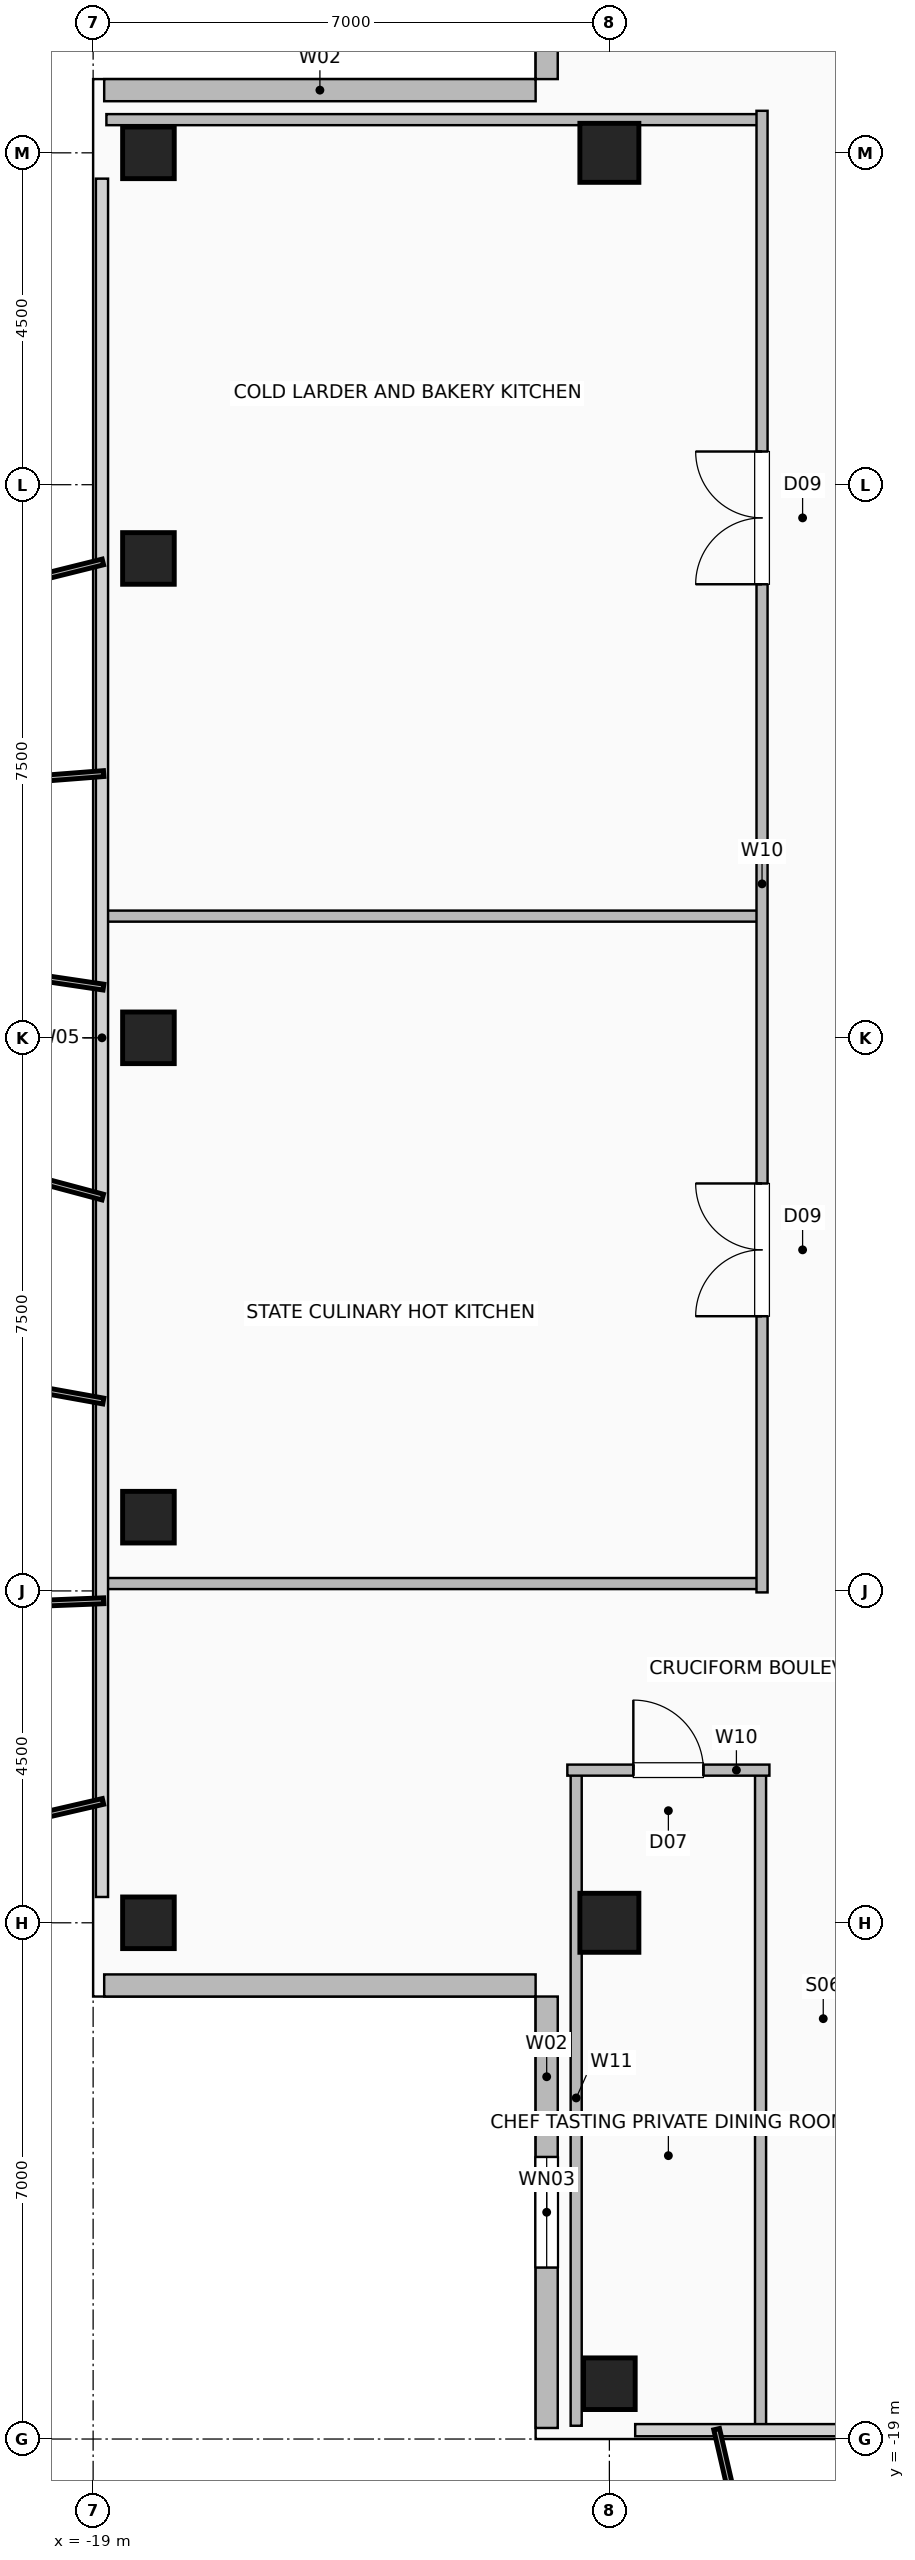
"""IFC4 building model, lengths in metres.
Left out: names, types, materials, properties, quantities, classifications, styles, units other than length and angle.
Written with IfcOpenShell. Run it as: python <this file> out.ifc"""

import sys

from ifc_helpers import new_model, si_unit, direction, frame, frame_2d, origin, origin_2d, place, context, subcontext, project, spatial, rectangle, hollow_rectangle, extrude, element, fill, save


model = new_model("IFC4")
c1 = context("Model", 3, precision=1e-05, world=origin(), true_north=direction((0.0, 1.0)))
c2 = subcontext(c1, "Body", "Model", "MODEL_VIEW")
j1 = project(units=[si_unit("LENGTHUNIT", "METRE"), si_unit("PLANEANGLEUNIT", "RADIAN")], contexts=[c1])
p1 = place(None, origin())
s1 = spatial("IfcSite", under=j1, at=p1, CompositionType="ELEMENT")
p2 = place(p1, origin())
s2 = spatial("IfcBuilding", under=s1, at=p2, CompositionType="ELEMENT")
p3 = place(p2, frame((0.0, 0.0, 261.2)))
s3 = spatial("IfcBuildingStorey", under=s2, at=p3, CompositionType="ELEMENT", Elevation=261.2)
for number, where, z_axis, x_axis in (
    (1, (-12.0, -18.25, 0.0), (0.0, 0.0, 1.0), (1.0, 0.0, 0.0)),
    (2, (-18.25, -12.0, 0.0), (0.0, 0.0, 1.0), (1.0, 0.0, 0.0)),
    (3, (-18.25, -6.5, 0.0), (0.0, 0.0, 1.0), (1.0, 0.0, 0.0)),
    (4, (-18.25, 0.0, 0.0), (0.0, 0.0, 1.0), (1.0, 0.0, 0.0)),
    (5, (-18.25, 6.5, 0.0), (0.0, 0.0, 1.0), (1.0, 0.0, 0.0)),
    (6, (-18.25, 12.0, 0.0), (0.0, 0.0, 1.0), (1.0, 0.0, 0.0)),
):
    element("IfcColumn", number, at=place(p3, frame(where, z_axis=z_axis, x_axis=x_axis)), inside=s3, PredefinedType="COLUMN", context=c2, shape_type="SweptSolid", body=[
        extrude(hollow_rectangle(XDim=0.7, YDim=0.7, WallThickness=0.035, at=origin_2d()), origin(), (0.0, 0.0, 1.0), 3.6),
    ])
for number, where, z_axis, x_axis in (
    (7, (-12.0, -12.0, 0.0), (0.0, 0.0, 1.0), (1.0, 0.0, 0.0)),
    (8, (-12.0, 12.0, 0.0), (0.0, 0.0, 1.0), (1.0, 0.0, 0.0)),
):
    element("IfcColumn", number, at=place(p3, frame(where, z_axis=z_axis, x_axis=x_axis)), inside=s3, PredefinedType="COLUMN", context=c2, shape_type="SweptSolid", body=[
        extrude(hollow_rectangle(XDim=0.8, YDim=0.8, WallThickness=0.04, at=origin_2d()), origin(), (0.0, 0.0, 1.0), 3.6),
    ])
p4 = place(p3, frame((-12.85, -18.85, 0.0), z_axis=(0.0, 0.0, 1.0), x_axis=(0.0, 1.0, 0.0)))
e9 = element("IfcWall", 9, at=p4, inside=s3, PredefinedType="SOLIDWALL", context=c2, shape_type="SweptSolid", body=[
    extrude(rectangle(XDim=5.85, YDim=0.3, at=frame_2d((2.925, 0.0))), origin(), (0.0, 0.0, 1.0), 3.36),
])
p5 = place(p4, frame((2.175, 0.0, 0.9)))
e10 = element("IfcOpeningElement", 10, at=p5, cuts=e9, PredefinedType="OPENING", context=c2, shape_type="SweptSolid", body=[
    extrude(rectangle(XDim=1.5, YDim=1.8, at=frame_2d((0.75, 0.9))), frame((0.0, 0.16, 0.0), z_axis=(0.0, -1.0, 0.0), x_axis=(1.0, 0.0, 0.0)), (0.0, 0.0, 1.0), 0.32),
])
p6 = place(p3, frame((-18.85, -12.85, 0.0), z_axis=(0.0, 0.0, 1.0), x_axis=(1.0, 0.0, 0.0)))
e11 = element("IfcWall", 11, at=p6, inside=s3, PredefinedType="SOLIDWALL", context=c2, shape_type="SweptSolid", body=[
    extrude(rectangle(XDim=5.85, YDim=0.3, at=frame_2d((2.925, 0.0))), origin(), (0.0, 0.0, 1.0), 3.36),
])
p7 = place(p3, frame((-12.85, 18.85, 0.0), z_axis=(0.0, 0.0, 1.0), x_axis=(0.0, -1.0, 0.0)))
e12 = element("IfcWall", 12, at=p7, inside=s3, PredefinedType="SOLIDWALL", context=c2, shape_type="SweptSolid", body=[
    extrude(rectangle(XDim=5.85, YDim=0.3, at=frame_2d((2.925, 0.0))), origin(), (0.0, 0.0, 1.0), 3.36),
])
p8 = place(p7, frame((2.175, 0.0, 0.9)))
e13 = element("IfcOpeningElement", 13, at=p8, cuts=e12, PredefinedType="OPENING", context=c2, shape_type="SweptSolid", body=[
    extrude(rectangle(XDim=1.5, YDim=1.8, at=frame_2d((0.75, 0.9))), frame((0.0, 0.16, 0.0), z_axis=(0.0, -1.0, 0.0), x_axis=(1.0, 0.0, 0.0)), (0.0, 0.0, 1.0), 0.32),
])
p9 = place(p3, frame((-18.85, 12.85, 0.0), z_axis=(0.0, 0.0, 1.0), x_axis=(1.0, 0.0, 0.0)))
e14 = element("IfcWall", 14, at=p9, inside=s3, PredefinedType="SOLIDWALL", context=c2, shape_type="SweptSolid", body=[
    extrude(rectangle(XDim=5.85, YDim=0.3, at=frame_2d((2.925, 0.0))), origin(), (0.0, 0.0, 1.0), 3.36),
])
for number, where, z_axis, x_axis in (
    (15, (-12.45, -18.82, 0.0), (0.0, 0.0, 1.0), (0.0, 1.0, 0.0)),
    (16, (-9.95, -18.82, 0.0), (0.0, 0.0, 1.0), (0.0, 1.0, 0.0)),
):
    element("IfcWall", number, at=place(p3, frame(where, z_axis=z_axis, x_axis=x_axis)), inside=s3, PredefinedType="PARTITIONING", context=c2, shape_type="SweptSolid", body=[
        extrude(rectangle(XDim=8.89, YDim=0.15, at=frame_2d((4.445, 0.0))), origin(), (0.0, 0.0, 1.0), 3.36),
    ])
p10 = place(p3, frame((-12.57, -9.93, 0.0), z_axis=(0.0, 0.0, 1.0), x_axis=(1.0, 0.0, 0.0)))
e17 = element("IfcWall", 17, at=p10, inside=s3, PredefinedType="PARTITIONING", context=c2, shape_type="SweptSolid", body=[
    extrude(rectangle(XDim=2.74, YDim=0.15, at=frame_2d((1.37, 0.0))), origin(), (0.0, 0.0, 1.0), 3.36),
])
p11 = place(p10, frame((0.895, 0.0, 0.0)))
e18 = element("IfcOpeningElement", 18, at=p11, cuts=e17, PredefinedType="OPENING", context=c2, shape_type="SweptSolid", body=[
    extrude(rectangle(XDim=0.95, YDim=2.06, at=frame_2d((0.475, 1.03))), frame((0.0, 0.085, 0.0), z_axis=(0.0, -1.0, 0.0), x_axis=(1.0, 0.0, 0.0)), (0.0, 0.0, 1.0), 0.17),
])
for number, where, z_axis, x_axis in (
    (19, (-18.82, -7.4, 0.0), (0.0, 0.0, 1.0), (1.0, 0.0, 0.0)),
    (20, (-18.82, 1.65, 0.0), (0.0, 0.0, 1.0), (1.0, 0.0, 0.0)),
    (21, (-18.82, 12.45, 0.0), (0.0, 0.0, 1.0), (1.0, 0.0, 0.0)),
):
    element("IfcWall", number, at=place(p3, frame(where, z_axis=z_axis, x_axis=x_axis)), inside=s3, PredefinedType="PARTITIONING", context=c2, shape_type="SweptSolid", body=[
        extrude(rectangle(XDim=8.89, YDim=0.15, at=frame_2d((4.445, 0.0))), origin(), (0.0, 0.0, 1.0), 3.36),
    ])
p12 = place(p3, frame((-9.93, -7.52, 0.0), z_axis=(0.0, 0.0, 1.0), x_axis=(0.0, 1.0, 0.0)))
e22 = element("IfcWall", 22, at=p12, inside=s3, PredefinedType="PARTITIONING", context=c2, shape_type="SweptSolid", body=[
    extrude(rectangle(XDim=20.09, YDim=0.15, at=frame_2d((10.045, 0.0))), origin(), (0.0, 0.0, 1.0), 3.36),
])
p13 = place(p12, frame((3.745, 0.0, 0.0)))
e23 = element("IfcOpeningElement", 23, at=p13, cuts=e22, PredefinedType="OPENING", context=c2, shape_type="SweptSolid", body=[
    extrude(rectangle(XDim=1.8, YDim=2.08, at=frame_2d((0.9, 1.04))), frame((0.0, 0.085, 0.0), z_axis=(0.0, -1.0, 0.0), x_axis=(1.0, 0.0, 0.0)), (0.0, 0.0, 1.0), 0.17),
])
p14 = place(p12, frame((13.67, 0.0, 0.0)))
e24 = element("IfcOpeningElement", 24, at=p14, cuts=e22, PredefinedType="OPENING", context=c2, shape_type="SweptSolid", body=[
    extrude(rectangle(XDim=1.8, YDim=2.08, at=frame_2d((0.9, 1.04))), frame((0.0, 0.085, 0.0), z_axis=(0.0, -1.0, 0.0), x_axis=(1.0, 0.0, 0.0)), (0.0, 0.0, 1.0), 0.17),
])
p15 = place(p5, origin())
e25 = element("IfcWindow", 25, at=p15, inside=s3, PartitioningType="SINGLE_PANEL", PredefinedType="WINDOW", context=c2, shape_type="SweptSolid", body=[
    extrude(rectangle(XDim=1.5, YDim=1.8, at=frame_2d((0.75, 0.9))), frame((0.0, 0.03, 0.0), z_axis=(0.0, -1.0, 0.0), x_axis=(1.0, 0.0, 0.0)), (0.0, 0.0, 1.0), 0.06),
])
fill(e10, e25)
p16 = place(p11, origin())
e26 = element("IfcDoor", 26, at=p16, inside=s3, OperationType="SINGLE_SWING_LEFT", PredefinedType="DOOR", context=c2, shape_type="SweptSolid", body=[
    extrude(rectangle(XDim=0.95, YDim=2.06, at=frame_2d((0.475, 1.03))), frame((0.0, 0.025, 0.0), z_axis=(0.0, -1.0, 0.0), x_axis=(1.0, 0.0, 0.0)), (0.0, 0.0, 1.0), 0.05),
])
fill(e18, e26)
p17 = place(p13, origin())
e27 = element("IfcDoor", 27, at=p17, inside=s3, OperationType="DOUBLE_DOOR_SINGLE_SWING", PredefinedType="DOOR", context=c2, shape_type="SweptSolid", body=[
    extrude(rectangle(XDim=1.8, YDim=2.08, at=frame_2d((0.9, 1.04))), frame((0.0, 0.025, 0.0), z_axis=(0.0, -1.0, 0.0), x_axis=(1.0, 0.0, 0.0)), (0.0, 0.0, 1.0), 0.05),
])
fill(e23, e27)
p18 = place(p14, origin())
e28 = element("IfcDoor", 28, at=p18, inside=s3, OperationType="DOUBLE_DOOR_SINGLE_SWING", PredefinedType="DOOR", context=c2, shape_type="SweptSolid", body=[
    extrude(rectangle(XDim=1.8, YDim=2.08, at=frame_2d((0.9, 1.04))), frame((0.0, 0.025, 0.0), z_axis=(0.0, -1.0, 0.0), x_axis=(1.0, 0.0, 0.0)), (0.0, 0.0, 1.0), 0.05),
])
fill(e24, e28)
save(model, sys.argv[1])
